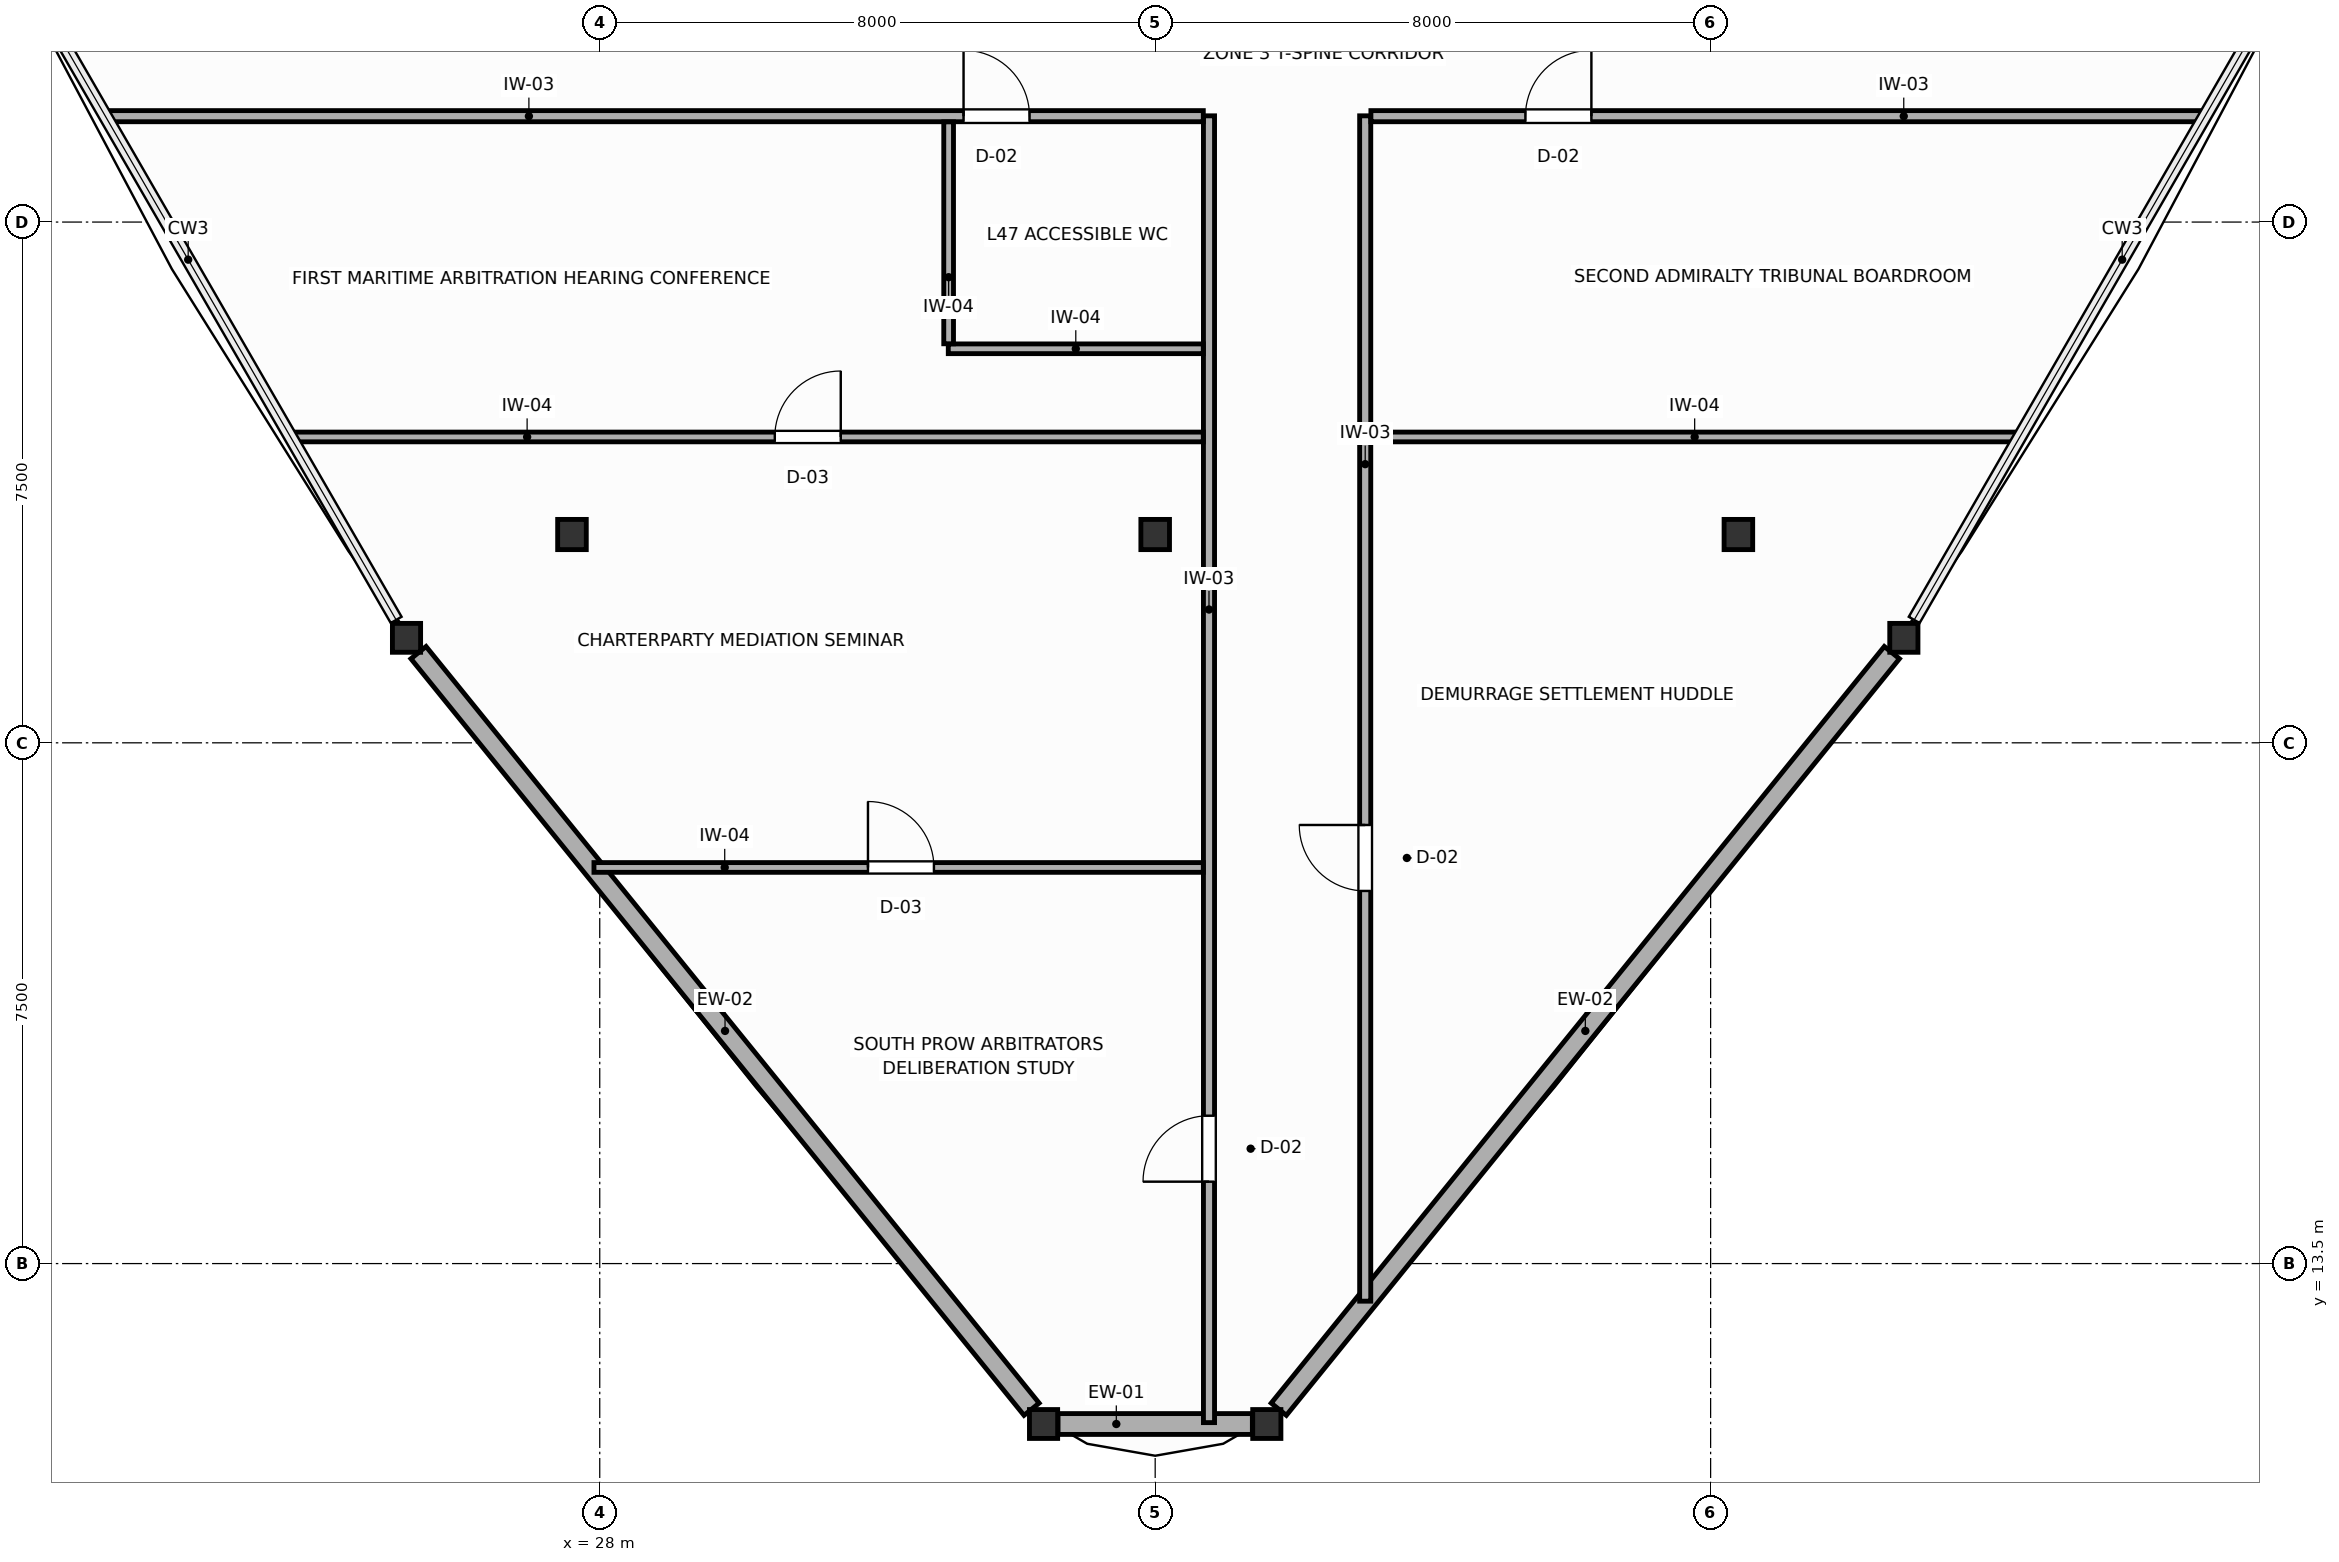
"""IFC4 building model, lengths in metres.
Left out: names, types, materials, properties, quantities, classifications, styles, units other than length and angle.
Written with IfcOpenShell. Run it as: python <this file> out.ifc"""

import sys

from ifc_helpers import new_model, si_unit, direction, frame, frame_2d, origin, origin_2d, place, context, subcontext, project, spatial, rectangle, i_section, extrude, source, transform, mapped, element, fill, save


model = new_model("IFC4")
c1 = context("Model", 3, precision=1e-05, world=origin(), true_north=direction((0.0, 1.0)))
c2 = subcontext(c1, "Body", "Model", "MODEL_VIEW")
j1 = project(units=[si_unit("LENGTHUNIT", "METRE"), si_unit("PLANEANGLEUNIT", "RADIAN")], contexts=[c1])
p1 = place(None, origin())
s1 = spatial("IfcSite", under=j1, at=p1, CompositionType="ELEMENT")
p2 = place(p1, origin())
s2 = spatial("IfcBuilding", under=s1, at=p2, CompositionType="ELEMENT")
p3 = place(p2, frame((0.0, 0.0, 183.0)))
s3 = spatial("IfcBuildingStorey", under=s2, at=p3, CompositionType="ELEMENT", Elevation=183.0)
m1 = source(origin(), c2, "Body", "SweptSolid", [
    extrude(i_section(OverallWidth=0.412, OverallDepth=0.435, WebThickness=0.033, FlangeThickness=0.053, FilletRadius=0.015, at=origin_2d()), origin(), (0.0, 0.0, 1.0), 3.6),
])
for number, where, z_axis, x_axis in (
    (1, (27.6, 24.0, 0.0), (0.0, 0.0, 1.0), (1.0, 0.0, 0.0)),
    (2, (44.4, 24.0, 0.0), (0.0, 0.0, 1.0), (1.0, 0.0, 0.0)),
    (3, (36.0, 24.0, 0.0), (0.0, 0.0, 1.0), (1.0, 0.0, 0.0)),
):
    element("IfcColumn", number, at=place(p3, frame(where, z_axis=z_axis, x_axis=x_axis)), inside=s3, PredefinedType="COLUMN", context=c2, shape_type="MappedRepresentation", body=[
        mapped(m1, transform((0.0, 0.0, 0.0), scale=1.0)),
    ])
m2 = source(origin(), c2, "Body", "SweptSolid", [
    extrude(i_section(OverallWidth=0.406, OverallDepth=0.416, WebThickness=0.027, FlangeThickness=0.044, FilletRadius=0.015, at=origin_2d()), origin(), (0.0, 0.0, 1.0), 3.6),
])
for number, where, z_axis, x_axis in (
    (4, (25.217, 22.512, 0.0), (0.0, 0.0, 1.0), (1.0, 0.0, 0.0)),
    (5, (34.392, 11.189, 0.0), (0.0, 0.0, 1.0), (1.0, 0.0, 0.0)),
    (6, (37.608, 11.189, 0.0), (0.0, 0.0, 1.0), (1.0, 0.0, 0.0)),
    (7, (46.783, 22.512, 0.0), (0.0, 0.0, 1.0), (1.0, 0.0, 0.0)),
):
    element("IfcColumn", number, at=place(p3, frame(where, z_axis=z_axis, x_axis=x_axis)), inside=s3, PredefinedType="COLUMN", context=c2, shape_type="MappedRepresentation", body=[
        mapped(m2, transform((0.0, 0.0, 0.0), scale=1.0)),
    ])
p4 = place(p3, frame((25.389, 22.299, 0.0), z_axis=(0.0, 0.0, 1.0), x_axis=(0.629601252026, -0.776918440666, 0.0)))
e8 = element("IfcWall", 8, at=p4, inside=s3, PredefinedType="SOLIDWALL", context=c2, shape_type="SweptSolid", body=[
    extrude(rectangle(XDim=14.025, YDim=0.28, at=frame_2d((7.013, 0.0))), origin(), (0.0, 0.0, 1.0), 1.87),
])
p5 = place(p3, frame((34.6, 11.189, 0.0), z_axis=(0.0, 0.0, 1.0), x_axis=(1.0, 0.0, 0.0)))
e9 = element("IfcWall", 9, at=p5, inside=s3, PredefinedType="SOLIDWALL", context=c2, shape_type="SweptSolid", body=[
    extrude(rectangle(XDim=2.799, YDim=0.3, at=frame_2d((1.4, 0.0))), origin(), (0.0, 0.0, 1.0), 1.87),
])
p6 = place(p3, frame((37.78, 11.403, 0.0), z_axis=(0.0, 0.0, 1.0), x_axis=(0.629601252026, 0.776918440666, 0.0)))
e10 = element("IfcWall", 10, at=p6, inside=s3, PredefinedType="SOLIDWALL", context=c2, shape_type="SweptSolid", body=[
    extrude(rectangle(XDim=14.025, YDim=0.28, at=frame_2d((7.013, 0.0))), origin(), (0.0, 0.0, 1.0), 1.87),
])
p7 = place(p3, frame((36.775, 11.209, 0.0), z_axis=(0.0, 0.0, 1.0), x_axis=(0.0, 1.0, 0.0)))
e11 = element("IfcWall", 11, at=p7, inside=s3, PredefinedType="PARTITIONING", context=c2, shape_type="SweptSolid", body=[
    extrude(rectangle(XDim=18.821, YDim=0.16, at=frame_2d((9.41, 0.0))), origin(), (0.0, 0.0, 1.0), 3.4),
])
p8 = place(p7, frame((3.47, 0.0, 0.0)))
e12 = element("IfcOpeningElement", 12, at=p8, cuts=e11, PredefinedType="OPENING", context=c2, shape_type="SweptSolid", body=[
    extrude(rectangle(XDim=0.95, YDim=2.05, at=frame_2d((0.475, 1.025))), frame((0.0, 0.09, 0.0), z_axis=(0.0, -1.0, 0.0), x_axis=(1.0, 0.0, 0.0)), (0.0, 0.0, 1.0), 0.18),
])
p9 = place(p3, frame((39.025, 12.958, 0.0), z_axis=(0.0, 0.0, 1.0), x_axis=(0.0, 1.0, 0.0)))
e13 = element("IfcWall", 13, at=p9, inside=s3, PredefinedType="PARTITIONING", context=c2, shape_type="SweptSolid", body=[
    extrude(rectangle(XDim=17.072, YDim=0.16, at=frame_2d((8.536, 0.0))), origin(), (0.0, 0.0, 1.0), 3.4),
])
p10 = place(p9, frame((5.908, 0.0, 0.0)))
e14 = element("IfcOpeningElement", 14, at=p10, cuts=e13, PredefinedType="OPENING", context=c2, shape_type="SweptSolid", body=[
    extrude(rectangle(XDim=0.95, YDim=2.05, at=frame_2d((0.475, 1.025))), frame((0.0, 0.09, 0.0), z_axis=(0.0, -1.0, 0.0), x_axis=(1.0, 0.0, 0.0)), (0.0, 0.0, 1.0), 0.18),
])
p11 = place(p3, frame((20.899, 30.025, 0.0), z_axis=(0.0, 0.0, 1.0), x_axis=(1.0, 0.0, 0.0)))
e15 = element("IfcWall", 15, at=p11, inside=s3, PredefinedType="PARTITIONING", context=c2, shape_type="SweptSolid", body=[
    extrude(rectangle(XDim=15.794, YDim=0.16, at=frame_2d((7.897, 0.0))), origin(), (0.0, 0.0, 1.0), 3.4),
])
p12 = place(p11, frame((12.341, 0.0, 0.0)))
e16 = element("IfcOpeningElement", 16, at=p12, cuts=e15, PredefinedType="OPENING", context=c2, shape_type="SweptSolid", body=[
    extrude(rectangle(XDim=0.95, YDim=2.05, at=frame_2d((0.475, 1.025))), frame((0.0, 0.09, 0.0), z_axis=(0.0, -1.0, 0.0), x_axis=(1.0, 0.0, 0.0)), (0.0, 0.0, 1.0), 0.18),
])
p13 = place(p3, frame((39.107, 30.025, 0.0), z_axis=(0.0, 0.0, 1.0), x_axis=(1.0, 0.0, 0.0)))
e17 = element("IfcWall", 17, at=p13, inside=s3, PredefinedType="PARTITIONING", context=c2, shape_type="SweptSolid", body=[
    extrude(rectangle(XDim=11.994, YDim=0.16, at=frame_2d((5.997, 0.0))), origin(), (0.0, 0.0, 1.0), 3.4),
])
p14 = place(p13, frame((2.226, 0.0, 0.0)))
e18 = element("IfcOpeningElement", 18, at=p14, cuts=e17, PredefinedType="OPENING", context=c2, shape_type="SweptSolid", body=[
    extrude(rectangle(XDim=0.95, YDim=2.05, at=frame_2d((0.475, 1.025))), frame((0.0, 0.09, 0.0), z_axis=(0.0, -1.0, 0.0), x_axis=(1.0, 0.0, 0.0)), (0.0, 0.0, 1.0), 0.18),
])
p15 = place(p3, frame((23.567, 25.405, 0.0), z_axis=(0.0, 0.0, 1.0), x_axis=(1.0, 0.0, 0.0)))
e19 = element("IfcWall", 19, at=p15, inside=s3, PredefinedType="PARTITIONING", context=c2, shape_type="SweptSolid", body=[
    extrude(rectangle(XDim=13.126, YDim=0.14, at=frame_2d((6.563, 0.0))), origin(), (0.0, 0.0, 1.0), 3.4),
])
p16 = place(p15, frame((6.955, 0.0, 0.0)))
e20 = element("IfcOpeningElement", 20, at=p16, cuts=e19, PredefinedType="OPENING", context=c2, shape_type="SweptSolid", body=[
    extrude(rectangle(XDim=0.95, YDim=2.05, at=frame_2d((0.475, 1.025))), frame((0.0, 0.08, 0.0), z_axis=(0.0, -1.0, 0.0), x_axis=(1.0, 0.0, 0.0)), (0.0, 0.0, 1.0), 0.16),
])
p17 = place(p3, frame((39.107, 25.405, 0.0), z_axis=(0.0, 0.0, 1.0), x_axis=(1.0, 0.0, 0.0)))
e21 = element("IfcWall", 21, at=p17, inside=s3, PredefinedType="PARTITIONING", context=c2, shape_type="SweptSolid", body=[
    extrude(rectangle(XDim=9.326, YDim=0.14, at=frame_2d((4.663, 0.0))), origin(), (0.0, 0.0, 1.0), 3.4),
])
p18 = place(p3, frame((27.917, 19.205, 0.0), z_axis=(0.0, 0.0, 1.0), x_axis=(1.0, 0.0, 0.0)))
e22 = element("IfcWall", 22, at=p18, inside=s3, PredefinedType="PARTITIONING", context=c2, shape_type="SweptSolid", body=[
    extrude(rectangle(XDim=8.776, YDim=0.14, at=frame_2d((4.388, 0.0))), origin(), (0.0, 0.0, 1.0), 3.4),
])
p19 = place(p18, frame((3.947, 0.0, 0.0)))
e23 = element("IfcOpeningElement", 23, at=p19, cuts=e22, PredefinedType="OPENING", context=c2, shape_type="SweptSolid", body=[
    extrude(rectangle(XDim=0.95, YDim=2.05, at=frame_2d((0.475, 1.025))), frame((0.0, 0.08, 0.0), z_axis=(0.0, -1.0, 0.0), x_axis=(1.0, 0.0, 0.0)), (0.0, 0.0, 1.0), 0.16),
])
p20 = place(p3, frame((33.02, 26.675, 0.0), z_axis=(0.0, 0.0, 1.0), x_axis=(1.0, 0.0, 0.0)))
e24 = element("IfcWall", 24, at=p20, inside=s3, PredefinedType="PARTITIONING", context=c2, shape_type="SweptSolid", body=[
    extrude(rectangle(XDim=3.673, YDim=0.14, at=frame_2d((1.836, 0.0))), origin(), (0.0, 0.0, 1.0), 3.4),
])
p21 = place(p3, frame((33.025, 26.747, 0.0), z_axis=(0.0, 0.0, 1.0), x_axis=(0.0, 1.0, 0.0)))
e25 = element("IfcWall", 25, at=p21, inside=s3, PredefinedType="PARTITIONING", context=c2, shape_type="SweptSolid", body=[
    extrude(rectangle(XDim=3.196, YDim=0.14, at=frame_2d((1.598, 0.0))), origin(), (0.0, 0.0, 1.0), 3.4),
])
p22 = place(p8, origin())
e26 = element("IfcDoor", 26, at=p22, inside=s3, OperationType="SINGLE_SWING_LEFT", PredefinedType="DOOR", context=c2, shape_type="SweptSolid", body=[
    extrude(rectangle(XDim=0.95, YDim=2.05, at=frame_2d((0.475, 1.025))), frame((0.0, 0.025, 0.0), z_axis=(0.0, -1.0, 0.0), x_axis=(1.0, 0.0, 0.0)), (0.0, 0.0, 1.0), 0.05),
])
fill(e12, e26)
p23 = place(p10, origin())
e27 = element("IfcDoor", 27, at=p23, inside=s3, OperationType="SINGLE_SWING_RIGHT", PredefinedType="DOOR", context=c2, shape_type="SweptSolid", body=[
    extrude(rectangle(XDim=0.95, YDim=2.05, at=frame_2d((0.475, 1.025))), frame((0.0, 0.025, 0.0), z_axis=(0.0, -1.0, 0.0), x_axis=(1.0, 0.0, 0.0)), (0.0, 0.0, 1.0), 0.05),
])
fill(e14, e27)
p24 = place(p12, origin())
e28 = element("IfcDoor", 28, at=p24, inside=s3, OperationType="SINGLE_SWING_LEFT", PredefinedType="DOOR", context=c2, shape_type="SweptSolid", body=[
    extrude(rectangle(XDim=0.95, YDim=2.05, at=frame_2d((0.475, 1.025))), frame((0.0, 0.025, 0.0), z_axis=(0.0, -1.0, 0.0), x_axis=(1.0, 0.0, 0.0)), (0.0, 0.0, 1.0), 0.05),
])
fill(e16, e28)
p25 = place(p14, origin())
e29 = element("IfcDoor", 29, at=p25, inside=s3, OperationType="SINGLE_SWING_RIGHT", PredefinedType="DOOR", context=c2, shape_type="SweptSolid", body=[
    extrude(rectangle(XDim=0.95, YDim=2.05, at=frame_2d((0.475, 1.025))), frame((0.0, 0.025, 0.0), z_axis=(0.0, -1.0, 0.0), x_axis=(1.0, 0.0, 0.0)), (0.0, 0.0, 1.0), 0.05),
])
fill(e18, e29)
p26 = place(p16, origin())
e30 = element("IfcDoor", 30, at=p26, inside=s3, OperationType="SINGLE_SWING_RIGHT", PredefinedType="DOOR", context=c2, shape_type="SweptSolid", body=[
    extrude(rectangle(XDim=0.95, YDim=2.05, at=frame_2d((0.475, 1.025))), frame((0.0, 0.025, 0.0), z_axis=(0.0, -1.0, 0.0), x_axis=(1.0, 0.0, 0.0)), (0.0, 0.0, 1.0), 0.05),
])
fill(e20, e30)
p27 = place(p19, origin())
e31 = element("IfcDoor", 31, at=p27, inside=s3, OperationType="SINGLE_SWING_LEFT", PredefinedType="DOOR", context=c2, shape_type="SweptSolid", body=[
    extrude(rectangle(XDim=0.95, YDim=2.05, at=frame_2d((0.475, 1.025))), frame((0.0, 0.025, 0.0), z_axis=(0.0, -1.0, 0.0), x_axis=(1.0, 0.0, 0.0)), (0.0, 0.0, 1.0), 0.05),
])
fill(e23, e31)
save(model, sys.argv[1])
